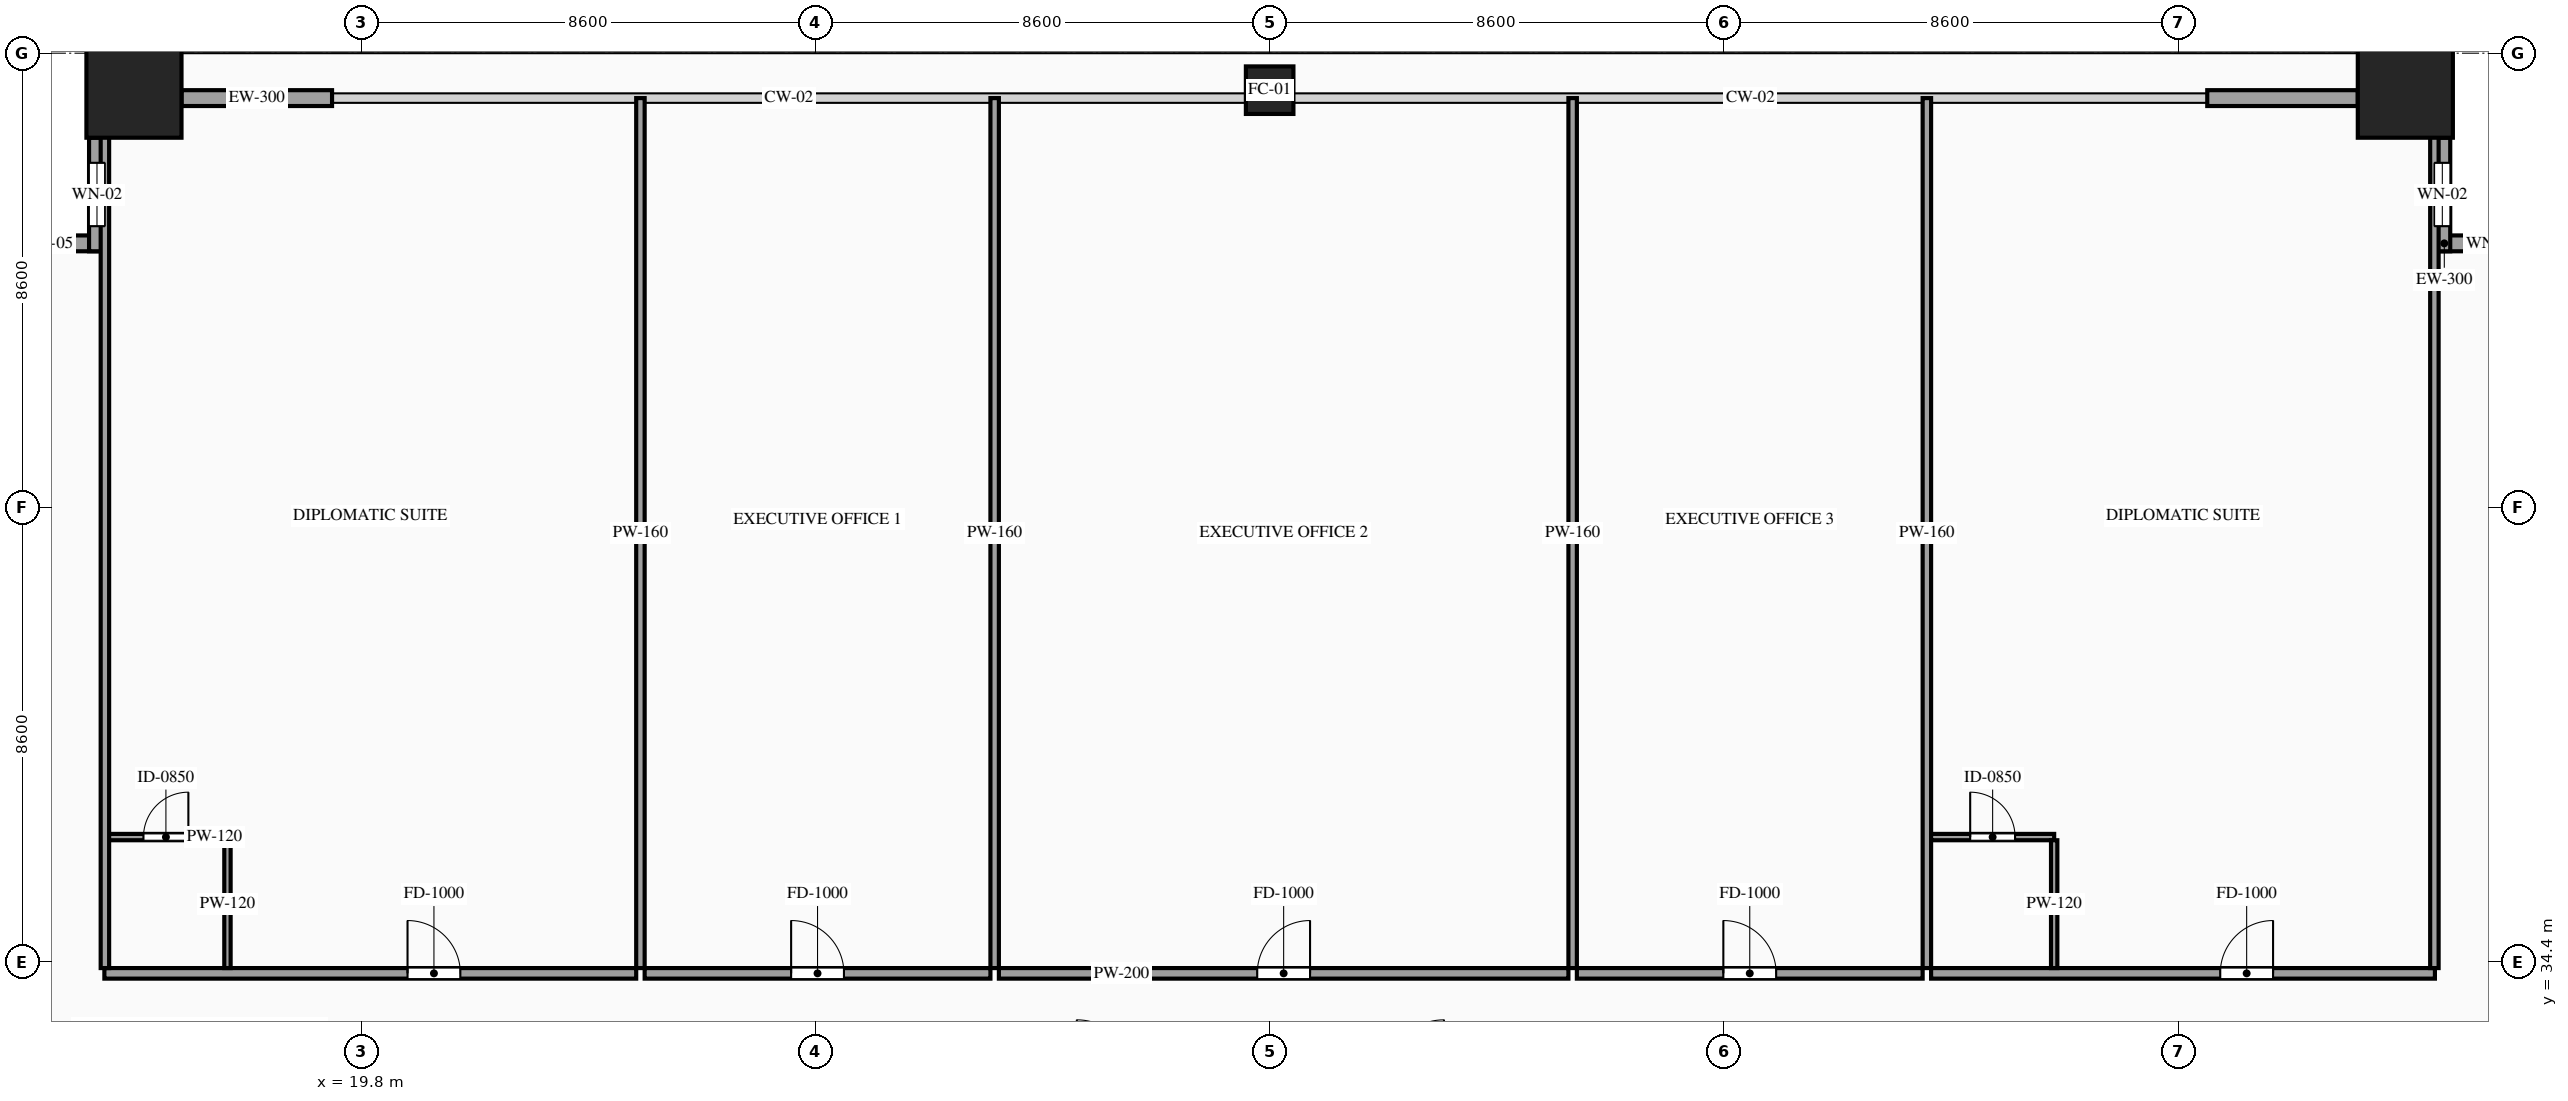
"""IFC4 building model, lengths in metres.
Left out: names, types, materials, properties, quantities, classifications, styles, units other than length and angle.
Written with IfcOpenShell. Run it as: python <this file> out.ifc"""

import sys

from ifc_helpers import new_model, si_unit, direction, frame, frame_2d, origin, origin_2d, place, context, subcontext, project, spatial, rectangle, hollow_rectangle, extrude, source, transform, mapped, element, fill, save


model = new_model("IFC4")
c1 = context("Model", 3, precision=1e-05, world=origin(), true_north=direction((0.0, 1.0)))
c2 = subcontext(c1, "Body", "Model", "MODEL_VIEW")
j1 = project(units=[si_unit("LENGTHUNIT", "METRE"), si_unit("PLANEANGLEUNIT", "RADIAN")], contexts=[c1])
p1 = place(None, origin())
s1 = spatial("IfcSite", under=j1, at=p1, CompositionType="ELEMENT")
p2 = place(p1, origin())
s2 = spatial("IfcBuilding", under=s1, at=p2, CompositionType="ELEMENT")
p3 = place(p2, frame((0.0, 0.0, 60.4)))
s3 = spatial("IfcBuildingStorey", under=s2, at=p3, CompositionType="ELEMENT", Elevation=60.4)
m1 = source(origin(), c2, "Body", "SweptSolid", [
    extrude(hollow_rectangle(XDim=1.8, YDim=1.8, WallThickness=0.08, at=origin_2d()), origin(), (0.0, 0.0, 1.0), 3.6),
])
p4 = place(p3, frame((15.5, 50.9, 0.0), z_axis=(0.0, 0.0, 1.0), x_axis=(1.0, 0.0, 0.0)))
e1 = element("IfcColumn", 1, at=p4, inside=s3, PredefinedType="COLUMN", context=c2, shape_type="MappedRepresentation", body=[
    mapped(m1, transform((0.0, 0.0, 0.0), scale=1.0)),
])
m2 = source(origin(), c2, "Body", "SweptSolid", [
    extrude(hollow_rectangle(XDim=0.9, YDim=0.9, WallThickness=0.042, at=origin_2d()), origin(), (0.0, 0.0, 1.0), 3.6),
])
p5 = place(p3, frame((37.0, 50.9, 0.0), z_axis=(0.0, 0.0, 1.0), x_axis=(1.0, 0.0, 0.0)))
e2 = element("IfcColumn", 2, at=p5, inside=s3, PredefinedType="COLUMN", context=c2, shape_type="MappedRepresentation", body=[
    mapped(m2, transform((0.0, 0.0, 0.0), scale=1.0)),
])
p6 = place(p3, frame((58.5, 50.9, 0.0), z_axis=(0.0, 0.0, 1.0), x_axis=(1.0, 0.0, 0.0)))
e3 = element("IfcColumn", 3, at=p6, inside=s3, PredefinedType="COLUMN", context=c2, shape_type="MappedRepresentation", body=[
    mapped(m1, transform((0.0, 0.0, 0.0), scale=1.0)),
])
p7 = place(p3, frame((14.95, 48.0, 0.0), z_axis=(0.0, 0.0, 1.0), x_axis=(-1.0, 0.0, 0.0)))
e4 = element("IfcWall", 4, at=p7, inside=s3, PredefinedType="SOLIDWALL", context=c2, shape_type="SweptSolid", body=[
    extrude(rectangle(XDim=2.15, YDim=0.3, at=frame_2d((1.075, 0.0))), origin(), (0.0, 0.0, 1.0), 3.38),
])
p8 = place(p7, frame((0.625, 0.0, 0.85)))
e5 = element("IfcOpeningElement", 5, at=p8, cuts=e4, PredefinedType="OPENING", context=c2, shape_type="SweptSolid", body=[
    extrude(rectangle(XDim=0.9, YDim=1.5, at=frame_2d((0.45, 0.75))), frame((0.0, 0.165, 0.0), z_axis=(0.0, -1.0, 0.0), x_axis=(1.0, 0.0, 0.0)), (0.0, 0.0, 1.0), 0.33),
])
p9 = place(p3, frame((14.8, 50.0, 0.0), z_axis=(0.0, 0.0, 1.0), x_axis=(0.0, -1.0, 0.0)))
e6 = element("IfcWall", 6, at=p9, inside=s3, PredefinedType="SOLIDWALL", context=c2, shape_type="SweptSolid", body=[
    extrude(rectangle(XDim=2.15, YDim=0.3, at=frame_2d((1.075, 0.0))), origin(), (0.0, 0.0, 1.0), 3.38),
])
p10 = place(p9, frame((0.475, 0.0, 0.85)))
e7 = element("IfcOpeningElement", 7, at=p10, cuts=e6, PredefinedType="OPENING", context=c2, shape_type="SweptSolid", body=[
    extrude(rectangle(XDim=1.2, YDim=2.1, at=frame_2d((0.6, 1.05))), frame((0.0, 0.165, 0.0), z_axis=(0.0, -1.0, 0.0), x_axis=(1.0, 0.0, 0.0)), (0.0, 0.0, 1.0), 0.33),
])
p11 = place(p3, frame((61.2, 48.0, 0.0), z_axis=(0.0, 0.0, 1.0), x_axis=(-1.0, 0.0, 0.0)))
e8 = element("IfcWall", 8, at=p11, inside=s3, PredefinedType="SOLIDWALL", context=c2, shape_type="SweptSolid", body=[
    extrude(rectangle(XDim=2.15, YDim=0.3, at=frame_2d((1.075, 0.0))), origin(), (0.0, 0.0, 1.0), 3.38),
])
p12 = place(p11, frame((0.625, 0.0, 0.85)))
e9 = element("IfcOpeningElement", 9, at=p12, cuts=e8, PredefinedType="OPENING", context=c2, shape_type="SweptSolid", body=[
    extrude(rectangle(XDim=0.9, YDim=1.5, at=frame_2d((0.45, 0.75))), frame((0.0, 0.165, 0.0), z_axis=(0.0, -1.0, 0.0), x_axis=(1.0, 0.0, 0.0)), (0.0, 0.0, 1.0), 0.33),
])
p13 = place(p3, frame((59.2, 47.85, 0.0), z_axis=(0.0, 0.0, 1.0), x_axis=(0.0, 1.0, 0.0)))
e10 = element("IfcWall", 10, at=p13, inside=s3, PredefinedType="SOLIDWALL", context=c2, shape_type="SweptSolid", body=[
    extrude(rectangle(XDim=2.15, YDim=0.3, at=frame_2d((1.075, 0.0))), origin(), (0.0, 0.0, 1.0), 3.38),
])
p14 = place(p13, frame((0.475, 0.0, 0.85)))
e11 = element("IfcOpeningElement", 11, at=p14, cuts=e10, PredefinedType="OPENING", context=c2, shape_type="SweptSolid", body=[
    extrude(rectangle(XDim=1.2, YDim=2.1, at=frame_2d((0.6, 1.05))), frame((0.0, 0.165, 0.0), z_axis=(0.0, -1.0, 0.0), x_axis=(1.0, 0.0, 0.0)), (0.0, 0.0, 1.0), 0.33),
])
m3 = source(origin(), c2, "Body", "SweptSolid", [
    extrude(rectangle(XDim=2.85, YDim=0.3, at=frame_2d((1.425, 0.0))), origin(), (0.0, 0.0, 1.0), 2.775),
])
for number, where, z_axis, x_axis in (
    (12, (16.4, 50.75, 0.0), (0.0, 0.0, 1.0), (1.0, 0.0, 0.0)),
    (13, (54.75, 50.75, 0.0), (0.0, 0.0, 1.0), (1.0, 0.0, 0.0)),
):
    element("IfcWall", number, at=place(p3, frame(where, z_axis=z_axis, x_axis=x_axis)), inside=s3, PredefinedType="SOLIDWALL", context=c2, shape_type="MappedRepresentation", body=[
        mapped(m3, transform((0.0, 0.0, 0.0), scale=1.0)),
    ])
p15 = place(p3, frame((14.94, 34.18, 0.0), z_axis=(0.0, 0.0, 1.0), x_axis=(1.0, 0.0, 0.0)))
e14 = element("IfcWall", 14, at=p15, inside=s3, PredefinedType="PARTITIONING", context=c2, shape_type="SweptSolid", body=[
    extrude(rectangle(XDim=10.068, YDim=0.2, at=frame_2d((5.034, 0.0))), origin(), (0.0, 0.0, 1.0), 3.38),
])
p16 = place(p15, frame((5.739, 0.0, 0.0)))
e15 = element("IfcOpeningElement", 15, at=p16, cuts=e14, PredefinedType="OPENING", context=c2, shape_type="SweptSolid", body=[
    extrude(rectangle(XDim=1.0, YDim=2.2, at=frame_2d((0.5, 1.1))), frame((0.0, 0.115, 0.0), z_axis=(0.0, -1.0, 0.0), x_axis=(1.0, 0.0, 0.0)), (0.0, 0.0, 1.0), 0.23),
])
m4 = source(origin(), c2, "Body", "SweptSolid", [
    extrude(rectangle(XDim=16.47, YDim=0.16, at=frame_2d((8.235, 0.0))), origin(), (0.0, 0.0, 1.0), 3.38),
])
p17 = place(p3, frame((25.088, 34.28, 0.0), z_axis=(0.0, 0.0, 1.0), x_axis=(0.0, 1.0, 0.0)))
e16 = element("IfcWall", 16, at=p17, inside=s3, PredefinedType="PARTITIONING", context=c2, shape_type="MappedRepresentation", body=[
    mapped(m4, transform((0.0, 0.0, 0.0), scale=1.0)),
])
p18 = place(p3, frame((14.94, 36.76, 0.0), z_axis=(0.0, 0.0, 1.0), x_axis=(1.0, 0.0, 0.0)))
e17 = element("IfcWall", 17, at=p18, inside=s3, PredefinedType="PARTITIONING", context=c2, shape_type="SweptSolid", body=[
    extrude(rectangle(XDim=2.33, YDim=0.12, at=frame_2d((1.165, 0.0))), origin(), (0.0, 0.0, 1.0), 3.38),
])
p19 = place(p18, frame((0.74, 0.0, 0.0)))
e18 = element("IfcOpeningElement", 18, at=p19, cuts=e17, PredefinedType="OPENING", context=c2, shape_type="SweptSolid", body=[
    extrude(rectangle(XDim=0.85, YDim=2.1, at=frame_2d((0.425, 1.05))), frame((0.0, 0.075, 0.0), z_axis=(0.0, -1.0, 0.0), x_axis=(1.0, 0.0, 0.0)), (0.0, 0.0, 1.0), 0.15),
])
m5 = source(origin(), c2, "Body", "SweptSolid", [
    extrude(rectangle(XDim=2.42, YDim=0.12, at=frame_2d((1.21, 0.0))), origin(), (0.0, 0.0, 1.0), 3.38),
])
p20 = place(p3, frame((17.27, 34.28, 0.0), z_axis=(0.0, 0.0, 1.0), x_axis=(0.0, 1.0, 0.0)))
e19 = element("IfcWall", 19, at=p20, inside=s3, PredefinedType="PARTITIONING", context=c2, shape_type="MappedRepresentation", body=[
    mapped(m5, transform((0.0, 0.0, 0.0), scale=1.0)),
])
p21 = place(p3, frame((25.168, 34.18, 0.0), z_axis=(0.0, 0.0, 1.0), x_axis=(1.0, 0.0, 0.0)))
e20 = element("IfcWall", 20, at=p21, inside=s3, PredefinedType="PARTITIONING", context=c2, shape_type="SweptSolid", body=[
    extrude(rectangle(XDim=6.546, YDim=0.2, at=frame_2d((3.273, 0.0))), origin(), (0.0, 0.0, 1.0), 3.38),
])
p22 = place(p21, frame((2.773, 0.0, 0.0)))
e21 = element("IfcOpeningElement", 21, at=p22, cuts=e20, PredefinedType="OPENING", context=c2, shape_type="SweptSolid", body=[
    extrude(rectangle(XDim=1.0, YDim=2.2, at=frame_2d((0.5, 1.1))), frame((0.0, 0.115, 0.0), z_axis=(0.0, -1.0, 0.0), x_axis=(1.0, 0.0, 0.0)), (0.0, 0.0, 1.0), 0.23),
])
p23 = place(p3, frame((31.794, 34.28, 0.0), z_axis=(0.0, 0.0, 1.0), x_axis=(0.0, 1.0, 0.0)))
e22 = element("IfcWall", 22, at=p23, inside=s3, PredefinedType="PARTITIONING", context=c2, shape_type="MappedRepresentation", body=[
    mapped(m4, transform((0.0, 0.0, 0.0), scale=1.0)),
])
p24 = place(p3, frame((31.874, 34.18, 0.0), z_axis=(0.0, 0.0, 1.0), x_axis=(1.0, 0.0, 0.0)))
e23 = element("IfcWall", 23, at=p24, inside=s3, PredefinedType="PARTITIONING", context=c2, shape_type="SweptSolid", body=[
    extrude(rectangle(XDim=10.782, YDim=0.2, at=frame_2d((5.391, 0.0))), origin(), (0.0, 0.0, 1.0), 3.38),
])
p25 = place(p24, frame((4.891, 0.0, 0.0)))
e24 = element("IfcOpeningElement", 24, at=p25, cuts=e23, PredefinedType="OPENING", context=c2, shape_type="SweptSolid", body=[
    extrude(rectangle(XDim=1.0, YDim=2.2, at=frame_2d((0.5, 1.1))), frame((0.0, 0.115, 0.0), z_axis=(0.0, -1.0, 0.0), x_axis=(1.0, 0.0, 0.0)), (0.0, 0.0, 1.0), 0.23),
])
p26 = place(p3, frame((42.736, 34.28, 0.0), z_axis=(0.0, 0.0, 1.0), x_axis=(0.0, 1.0, 0.0)))
e25 = element("IfcWall", 25, at=p26, inside=s3, PredefinedType="PARTITIONING", context=c2, shape_type="MappedRepresentation", body=[
    mapped(m4, transform((0.0, 0.0, 0.0), scale=1.0)),
])
p27 = place(p3, frame((42.816, 34.18, 0.0), z_axis=(0.0, 0.0, 1.0), x_axis=(1.0, 0.0, 0.0)))
e26 = element("IfcWall", 26, at=p27, inside=s3, PredefinedType="PARTITIONING", context=c2, shape_type="SweptSolid", body=[
    extrude(rectangle(XDim=6.546, YDim=0.2, at=frame_2d((3.273, 0.0))), origin(), (0.0, 0.0, 1.0), 3.38),
])
p28 = place(p27, frame((2.773, 0.0, 0.0)))
e27 = element("IfcOpeningElement", 27, at=p28, cuts=e26, PredefinedType="OPENING", context=c2, shape_type="SweptSolid", body=[
    extrude(rectangle(XDim=1.0, YDim=2.2, at=frame_2d((0.5, 1.1))), frame((0.0, 0.115, 0.0), z_axis=(0.0, -1.0, 0.0), x_axis=(1.0, 0.0, 0.0)), (0.0, 0.0, 1.0), 0.23),
])
p29 = place(p3, frame((49.442, 34.28, 0.0), z_axis=(0.0, 0.0, 1.0), x_axis=(0.0, 1.0, 0.0)))
e28 = element("IfcWall", 28, at=p29, inside=s3, PredefinedType="PARTITIONING", context=c2, shape_type="MappedRepresentation", body=[
    mapped(m4, transform((0.0, 0.0, 0.0), scale=1.0)),
])
p30 = place(p3, frame((49.522, 34.18, 0.0), z_axis=(0.0, 0.0, 1.0), x_axis=(1.0, 0.0, 0.0)))
e29 = element("IfcWall", 29, at=p30, inside=s3, PredefinedType="PARTITIONING", context=c2, shape_type="SweptSolid", body=[
    extrude(rectangle(XDim=9.538, YDim=0.2, at=frame_2d((4.769, 0.0))), origin(), (0.0, 0.0, 1.0), 3.38),
])
p31 = place(p30, frame((5.474, 0.0, 0.0)))
e30 = element("IfcOpeningElement", 30, at=p31, cuts=e29, PredefinedType="OPENING", context=c2, shape_type="SweptSolid", body=[
    extrude(rectangle(XDim=1.0, YDim=2.2, at=frame_2d((0.5, 1.1))), frame((0.0, 0.115, 0.0), z_axis=(0.0, -1.0, 0.0), x_axis=(1.0, 0.0, 0.0)), (0.0, 0.0, 1.0), 0.23),
])
m6 = source(origin(), c2, "Body", "SweptSolid", [
    extrude(rectangle(XDim=16.32, YDim=0.16, at=frame_2d((8.16, 0.0))), origin(), (0.0, 0.0, 1.0), 3.38),
])
for number, where, z_axis, x_axis in (
    (31, (14.95, 34.28, 0.0), (0.0, 0.0, 1.0), (0.0, 1.0, 0.0)),
    (32, (59.05, 34.28, 0.0), (0.0, 0.0, 1.0), (0.0, 1.0, 0.0)),
):
    element("IfcWall", number, at=place(p3, frame(where, z_axis=z_axis, x_axis=x_axis)), inside=s3, PredefinedType="PARTITIONING", context=c2, shape_type="MappedRepresentation", body=[
        mapped(m6, transform((0.0, 0.0, 0.0), scale=1.0)),
    ])
p32 = place(p3, frame((49.522, 36.76, 0.0), z_axis=(0.0, 0.0, 1.0), x_axis=(1.0, 0.0, 0.0)))
e33 = element("IfcWall", 33, at=p32, inside=s3, PredefinedType="PARTITIONING", context=c2, shape_type="SweptSolid", body=[
    extrude(rectangle(XDim=2.33, YDim=0.12, at=frame_2d((1.165, 0.0))), origin(), (0.0, 0.0, 1.0), 3.38),
])
p33 = place(p32, frame((0.74, 0.0, 0.0)))
e34 = element("IfcOpeningElement", 34, at=p33, cuts=e33, PredefinedType="OPENING", context=c2, shape_type="SweptSolid", body=[
    extrude(rectangle(XDim=0.85, YDim=2.1, at=frame_2d((0.425, 1.05))), frame((0.0, 0.075, 0.0), z_axis=(0.0, -1.0, 0.0), x_axis=(1.0, 0.0, 0.0)), (0.0, 0.0, 1.0), 0.15),
])
p34 = place(p3, frame((51.852, 34.28, 0.0), z_axis=(0.0, 0.0, 1.0), x_axis=(0.0, 1.0, 0.0)))
e35 = element("IfcWall", 35, at=p34, inside=s3, PredefinedType="PARTITIONING", context=c2, shape_type="MappedRepresentation", body=[
    mapped(m5, transform((0.0, 0.0, 0.0), scale=1.0)),
])
m7 = source(origin(), c2, "Body", "SweptSolid", [
    extrude(rectangle(XDim=0.9, YDim=1.5, at=frame_2d((0.45, 0.75))), frame((0.0, 0.03, 0.0), z_axis=(0.0, -1.0, 0.0), x_axis=(1.0, 0.0, 0.0)), (0.0, 0.0, 1.0), 0.06),
])
p35 = place(p8, origin())
e36 = element("IfcWindow", 36, at=p35, inside=s3, PartitioningType="SINGLE_PANEL", PredefinedType="WINDOW", context=c2, shape_type="MappedRepresentation", body=[
    mapped(m7, transform((0.0, 0.0, 0.0), scale=1.0)),
])
fill(e5, e36)
m8 = source(origin(), c2, "Body", "SweptSolid", [
    extrude(rectangle(XDim=1.2, YDim=2.1, at=frame_2d((0.6, 1.05))), frame((0.0, 0.03, 0.0), z_axis=(0.0, -1.0, 0.0), x_axis=(1.0, 0.0, 0.0)), (0.0, 0.0, 1.0), 0.06),
])
p36 = place(p10, origin())
e37 = element("IfcWindow", 37, at=p36, inside=s3, PartitioningType="SINGLE_PANEL", PredefinedType="WINDOW", context=c2, shape_type="MappedRepresentation", body=[
    mapped(m8, transform((0.0, 0.0, 0.0), scale=1.0)),
])
fill(e7, e37)
p37 = place(p12, origin())
e38 = element("IfcWindow", 38, at=p37, inside=s3, PartitioningType="SINGLE_PANEL", PredefinedType="WINDOW", context=c2, shape_type="MappedRepresentation", body=[
    mapped(m7, transform((0.0, 0.0, 0.0), scale=1.0)),
])
fill(e9, e38)
p38 = place(p14, origin())
e39 = element("IfcWindow", 39, at=p38, inside=s3, PartitioningType="SINGLE_PANEL", PredefinedType="WINDOW", context=c2, shape_type="MappedRepresentation", body=[
    mapped(m8, transform((0.0, 0.0, 0.0), scale=1.0)),
])
fill(e11, e39)
m9 = source(origin(), c2, "Body", "SweptSolid", [
    extrude(rectangle(XDim=1.0, YDim=2.2, at=frame_2d((0.5, 1.1))), frame((0.0, 0.025, 0.0), z_axis=(0.0, -1.0, 0.0), x_axis=(1.0, 0.0, 0.0)), (0.0, 0.0, 1.0), 0.05),
])
p39 = place(p16, origin())
e40 = element("IfcDoor", 40, at=p39, inside=s3, OperationType="SINGLE_SWING_LEFT", PredefinedType="DOOR", context=c2, shape_type="MappedRepresentation", body=[
    mapped(m9, transform((0.0, 0.0, 0.0), scale=1.0)),
])
fill(e15, e40)
m10 = source(origin(), c2, "Body", "SweptSolid", [
    extrude(rectangle(XDim=0.85, YDim=2.1, at=frame_2d((0.425, 1.05))), frame((0.0, 0.025, 0.0), z_axis=(0.0, -1.0, 0.0), x_axis=(1.0, 0.0, 0.0)), (0.0, 0.0, 1.0), 0.05),
])
p40 = place(p19, origin())
e41 = element("IfcDoor", 41, at=p40, inside=s3, OperationType="SINGLE_SWING_RIGHT", PredefinedType="DOOR", context=c2, shape_type="MappedRepresentation", body=[
    mapped(m10, transform((0.0, 0.0, 0.0), scale=1.0)),
])
fill(e18, e41)
p41 = place(p22, origin())
e42 = element("IfcDoor", 42, at=p41, inside=s3, OperationType="SINGLE_SWING_LEFT", PredefinedType="DOOR", context=c2, shape_type="MappedRepresentation", body=[
    mapped(m9, transform((0.0, 0.0, 0.0), scale=1.0)),
])
fill(e21, e42)
p42 = place(p25, origin())
e43 = element("IfcDoor", 43, at=p42, inside=s3, OperationType="SINGLE_SWING_RIGHT", PredefinedType="DOOR", context=c2, shape_type="MappedRepresentation", body=[
    mapped(m9, transform((0.0, 0.0, 0.0), scale=1.0)),
])
fill(e24, e43)
p43 = place(p28, origin())
e44 = element("IfcDoor", 44, at=p43, inside=s3, OperationType="SINGLE_SWING_LEFT", PredefinedType="DOOR", context=c2, shape_type="MappedRepresentation", body=[
    mapped(m9, transform((0.0, 0.0, 0.0), scale=1.0)),
])
fill(e27, e44)
p44 = place(p31, origin())
e45 = element("IfcDoor", 45, at=p44, inside=s3, OperationType="SINGLE_SWING_RIGHT", PredefinedType="DOOR", context=c2, shape_type="MappedRepresentation", body=[
    mapped(m9, transform((0.0, 0.0, 0.0), scale=1.0)),
])
fill(e30, e45)
p45 = place(p33, origin())
e46 = element("IfcDoor", 46, at=p45, inside=s3, OperationType="SINGLE_SWING_LEFT", PredefinedType="DOOR", context=c2, shape_type="MappedRepresentation", body=[
    mapped(m10, transform((0.0, 0.0, 0.0), scale=1.0)),
])
fill(e34, e46)
save(model, sys.argv[1])
